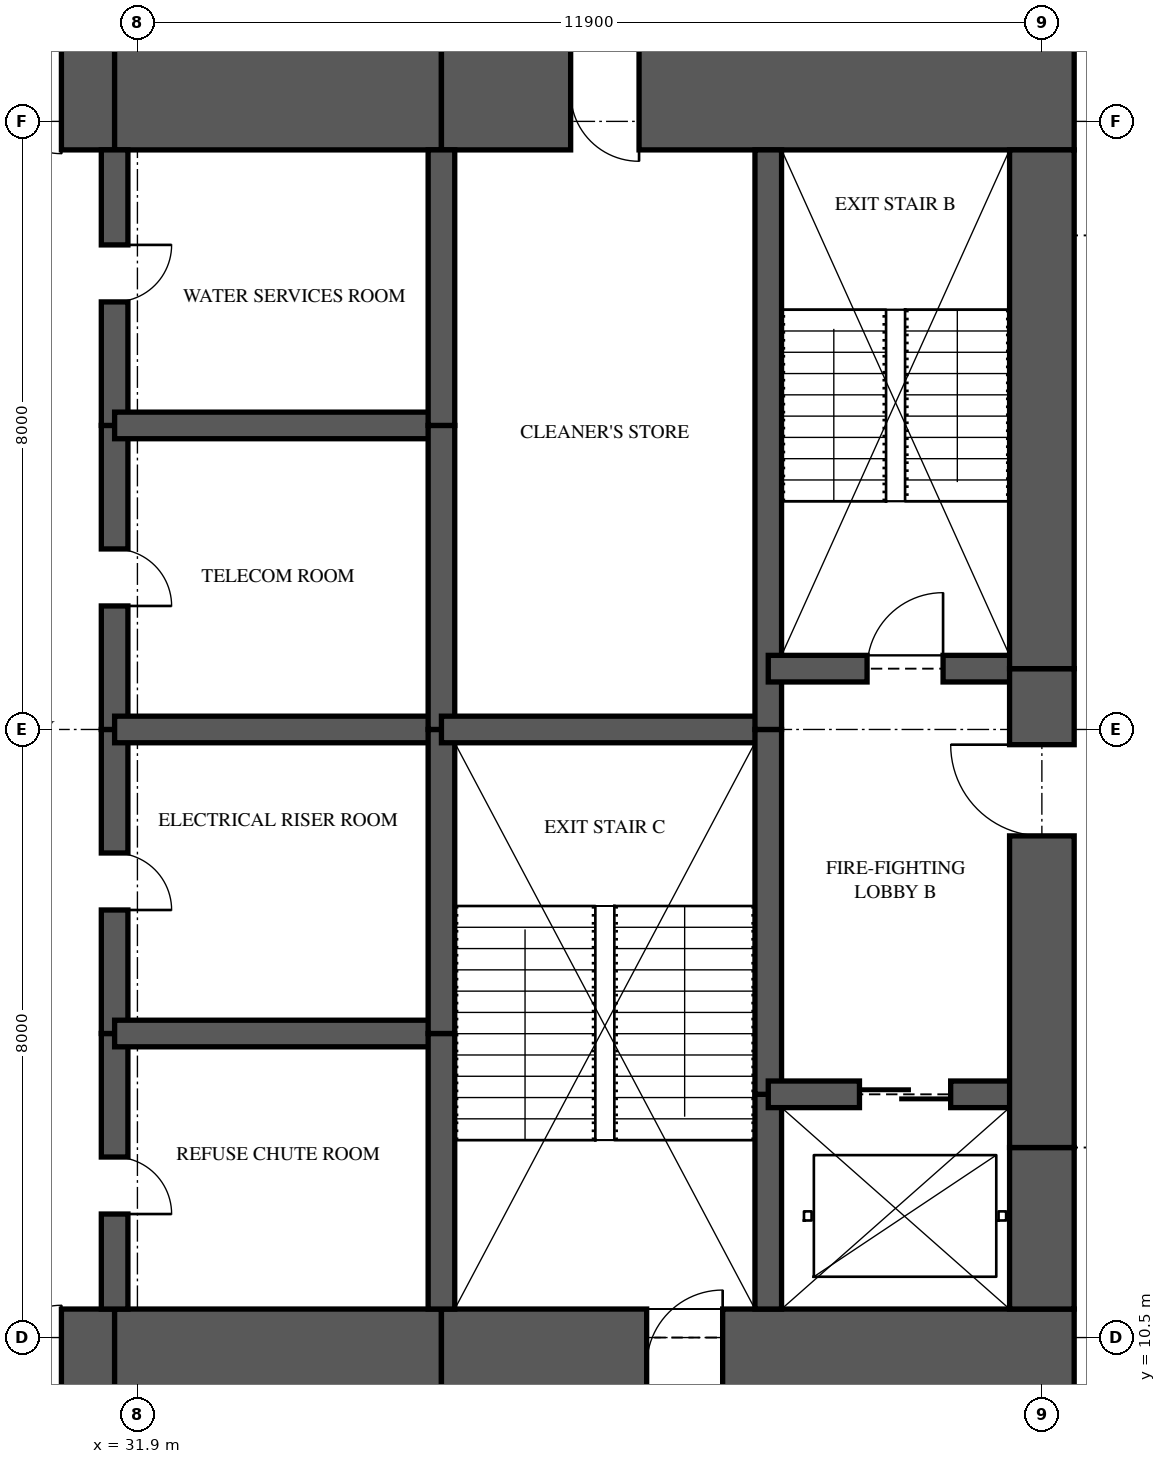
"""IFC4 building model, lengths in metres.
Left out: names, types, materials, properties, quantities, classifications, styles, units other than length and angle.
Written with IfcOpenShell. Run it as: python <this file> out.ifc"""

import sys

from ifc_helpers import new_model, si_unit, direction, frame, frame_2d, origin, place, context, subcontext, project, spatial, rectangle, extrude, element, fill, save


model = new_model("IFC4")
c1 = context("Model", 3, precision=1e-05, world=origin(), true_north=direction((0.0, 1.0)))
c2 = subcontext(c1, "Body", "Model", "MODEL_VIEW")
j1 = project(units=[si_unit("LENGTHUNIT", "METRE"), si_unit("PLANEANGLEUNIT", "RADIAN")], contexts=[c1])
p1 = place(None, origin())
s1 = spatial("IfcSite", under=j1, at=p1, CompositionType="ELEMENT")
p2 = place(p1, origin())
s2 = spatial("IfcBuilding", under=s1, at=p2, CompositionType="ELEMENT")
p3 = place(p2, frame((0.0, 0.0, 88.1)))
s3 = spatial("IfcBuildingStorey", under=s2, at=p3, CompositionType="ELEMENT", Elevation=88.1)
p4 = place(p3, frame((26.0, 10.125, 0.0), z_axis=(0.0, 0.0, 1.0), x_axis=(1.0, 0.0, 0.0)))
e1 = element("IfcWall", 1, at=p4, inside=s3, PredefinedType="SHEAR", context=c2, shape_type="SweptSolid", body=[
    extrude(rectangle(XDim=5.6, YDim=1.5, at=frame_2d((2.8, 0.0))), origin(), (0.0, 0.0, 1.0), 3.35),
])
p5 = place(p4, frame((3.3, 0.0, 0.0)))
e2 = element("IfcOpeningElement", 2, at=p5, cuts=e1, PredefinedType="OPENING", context=c2, shape_type="SweptSolid", body=[
    extrude(rectangle(XDim=1.6, YDim=2.1, at=frame_2d((0.8, 1.05))), frame((0.0, 0.76, 0.0), z_axis=(0.0, -1.0, 0.0), x_axis=(1.0, 0.0, 0.0)), (0.0, 0.0, 1.0), 1.52),
])
p6 = place(p3, frame((31.6, 10.125, 0.0), z_axis=(0.0, 0.0, 1.0), x_axis=(1.0, 0.0, 0.0)))
e3 = element("IfcWall", 3, at=p6, inside=s3, PredefinedType="SHEAR", context=c2, shape_type="SweptSolid", body=[
    extrude(rectangle(XDim=4.3, YDim=1.5, at=frame_2d((2.15, 0.0))), origin(), (0.0, 0.0, 1.0), 3.35),
])
p7 = place(p3, frame((35.9, 10.125, 0.0), z_axis=(0.0, 0.0, 1.0), x_axis=(1.0, 0.0, 0.0)))
e4 = element("IfcWall", 4, at=p7, inside=s3, PredefinedType="SHEAR", context=c2, shape_type="SweptSolid", body=[
    extrude(rectangle(XDim=8.325, YDim=1.5, at=frame_2d((4.163, 0.0))), origin(), (0.0, 0.0, 1.0), 3.35),
])
p8 = place(p7, frame((2.7, 0.0, 0.0)))
e5 = element("IfcOpeningElement", 5, at=p8, cuts=e4, PredefinedType="OPENING", context=c2, shape_type="SweptSolid", body=[
    extrude(rectangle(XDim=1.0, YDim=2.1, at=frame_2d((0.5, 1.05))), frame((0.0, 0.76, 0.0), z_axis=(0.0, -1.0, 0.0), x_axis=(1.0, 0.0, 0.0)), (0.0, 0.0, 1.0), 1.52),
])
p9 = place(p3, frame((44.225, 26.875, 0.0), z_axis=(0.0, 0.0, 1.0), x_axis=(-1.0, 0.0, 0.0)))
e6 = element("IfcWall", 6, at=p9, inside=s3, PredefinedType="SHEAR", context=c2, shape_type="SweptSolid", body=[
    extrude(rectangle(XDim=8.325, YDim=1.5, at=frame_2d((4.163, 0.0))), origin(), (0.0, 0.0, 1.0), 3.35),
])
p10 = place(p9, frame((5.725, 0.0, 0.0)))
e7 = element("IfcOpeningElement", 7, at=p10, cuts=e6, PredefinedType="OPENING", context=c2, shape_type="SweptSolid", body=[
    extrude(rectangle(XDim=0.9, YDim=2.1, at=frame_2d((0.45, 1.05))), frame((0.0, 0.76, 0.0), z_axis=(0.0, -1.0, 0.0), x_axis=(1.0, 0.0, 0.0)), (0.0, 0.0, 1.0), 1.52),
])
p11 = place(p3, frame((35.9, 26.875, 0.0), z_axis=(0.0, 0.0, 1.0), x_axis=(-1.0, 0.0, 0.0)))
e8 = element("IfcWall", 8, at=p11, inside=s3, PredefinedType="SHEAR", context=c2, shape_type="SweptSolid", body=[
    extrude(rectangle(XDim=4.3, YDim=1.5, at=frame_2d((2.15, 0.0))), origin(), (0.0, 0.0, 1.0), 3.35),
])
p12 = place(p3, frame((31.6, 26.875, 0.0), z_axis=(0.0, 0.0, 1.0), x_axis=(-1.0, 0.0, 0.0)))
e9 = element("IfcWall", 9, at=p12, inside=s3, PredefinedType="SHEAR", context=c2, shape_type="SweptSolid", body=[
    extrude(rectangle(XDim=5.6, YDim=1.5, at=frame_2d((2.8, 0.0))), origin(), (0.0, 0.0, 1.0), 3.35),
])
p13 = place(p12, frame((0.7, 0.0, 0.0)))
e10 = element("IfcOpeningElement", 10, at=p13, cuts=e9, PredefinedType="OPENING", context=c2, shape_type="SweptSolid", body=[
    extrude(rectangle(XDim=1.6, YDim=2.1, at=frame_2d((0.8, 1.05))), frame((0.0, 0.76, 0.0), z_axis=(0.0, -1.0, 0.0), x_axis=(1.0, 0.0, 0.0)), (0.0, 0.0, 1.0), 1.52),
])
p14 = place(p3, frame((43.8, 10.875, 0.0), z_axis=(0.0, 0.0, 1.0), x_axis=(0.0, 1.0, 0.0)))
e11 = element("IfcWall", 11, at=p14, inside=s3, PredefinedType="SHEAR", context=c2, shape_type="SweptSolid", body=[
    extrude(rectangle(XDim=2.125, YDim=0.85, at=frame_2d((1.062, 0.0))), origin(), (0.0, 0.0, 1.0), 3.35),
])
p15 = place(p3, frame((43.8, 13.0, 0.0), z_axis=(0.0, 0.0, 1.0), x_axis=(0.0, 1.0, 0.0)))
e12 = element("IfcWall", 12, at=p15, inside=s3, PredefinedType="SHEAR", context=c2, shape_type="SweptSolid", body=[
    extrude(rectangle(XDim=6.3, YDim=0.85, at=frame_2d((3.15, 0.0))), origin(), (0.0, 0.0, 1.0), 3.35),
])
p16 = place(p15, frame((4.1, 0.0, 0.0)))
e13 = element("IfcOpeningElement", 13, at=p16, cuts=e12, PredefinedType="OPENING", context=c2, shape_type="SweptSolid", body=[
    extrude(rectangle(XDim=1.2, YDim=2.2, at=frame_2d((0.6, 1.1))), frame((0.0, 0.435, 0.0), z_axis=(0.0, -1.0, 0.0), x_axis=(1.0, 0.0, 0.0)), (0.0, 0.0, 1.0), 0.87),
])
p17 = place(p3, frame((43.8, 19.3, 0.0), z_axis=(0.0, 0.0, 1.0), x_axis=(0.0, 1.0, 0.0)))
e14 = element("IfcWall", 14, at=p17, inside=s3, PredefinedType="SHEAR", context=c2, shape_type="SweptSolid", body=[
    extrude(rectangle(XDim=6.825, YDim=0.85, at=frame_2d((3.413, 0.0))), origin(), (0.0, 0.0, 1.0), 3.35),
])
p18 = place(p3, frame((31.6, 10.875, 0.0), z_axis=(0.0, 0.0, 1.0), x_axis=(0.0, 1.0, 0.0)))
e15 = element("IfcWall", 15, at=p18, inside=s3, PredefinedType="SHEAR", context=c2, shape_type="SweptSolid", body=[
    extrude(rectangle(XDim=3.625, YDim=0.35, at=frame_2d((1.812, 0.0))), origin(), (0.0, 0.0, 1.0), 3.35),
])
p19 = place(p18, frame((1.25, 0.0, 0.0)))
e16 = element("IfcOpeningElement", 16, at=p19, cuts=e15, PredefinedType="OPENING", context=c2, shape_type="SweptSolid", body=[
    extrude(rectangle(XDim=0.75, YDim=2.1, at=frame_2d((0.375, 1.05))), frame((0.0, 0.185, 0.0), z_axis=(0.0, -1.0, 0.0), x_axis=(1.0, 0.0, 0.0)), (0.0, 0.0, 1.0), 0.37),
])
p20 = place(p3, frame((31.6, 14.5, 0.0), z_axis=(0.0, 0.0, 1.0), x_axis=(0.0, 1.0, 0.0)))
e17 = element("IfcWall", 17, at=p20, inside=s3, PredefinedType="SHEAR", context=c2, shape_type="SweptSolid", body=[
    extrude(rectangle(XDim=4.0, YDim=0.35, at=frame_2d((2.0, 0.0))), origin(), (0.0, 0.0, 1.0), 3.35),
])
p21 = place(p20, frame((1.625, 0.0, 0.0)))
e18 = element("IfcOpeningElement", 18, at=p21, cuts=e17, PredefinedType="OPENING", context=c2, shape_type="SweptSolid", body=[
    extrude(rectangle(XDim=0.75, YDim=2.1, at=frame_2d((0.375, 1.05))), frame((0.0, 0.185, 0.0), z_axis=(0.0, -1.0, 0.0), x_axis=(1.0, 0.0, 0.0)), (0.0, 0.0, 1.0), 0.37),
])
p22 = place(p3, frame((31.6, 18.5, 0.0), z_axis=(0.0, 0.0, 1.0), x_axis=(0.0, 1.0, 0.0)))
e19 = element("IfcWall", 19, at=p22, inside=s3, PredefinedType="SHEAR", context=c2, shape_type="SweptSolid", body=[
    extrude(rectangle(XDim=4.0, YDim=0.35, at=frame_2d((2.0, 0.0))), origin(), (0.0, 0.0, 1.0), 3.35),
])
p23 = place(p22, frame((1.625, 0.0, 0.0)))
e20 = element("IfcOpeningElement", 20, at=p23, cuts=e19, PredefinedType="OPENING", context=c2, shape_type="SweptSolid", body=[
    extrude(rectangle(XDim=0.75, YDim=2.1, at=frame_2d((0.375, 1.05))), frame((0.0, 0.185, 0.0), z_axis=(0.0, -1.0, 0.0), x_axis=(1.0, 0.0, 0.0)), (0.0, 0.0, 1.0), 0.37),
])
p24 = place(p3, frame((31.6, 22.5, 0.0), z_axis=(0.0, 0.0, 1.0), x_axis=(0.0, 1.0, 0.0)))
e21 = element("IfcWall", 21, at=p24, inside=s3, PredefinedType="SHEAR", context=c2, shape_type="SweptSolid", body=[
    extrude(rectangle(XDim=3.625, YDim=0.35, at=frame_2d((1.812, 0.0))), origin(), (0.0, 0.0, 1.0), 3.35),
])
p25 = place(p24, frame((1.625, 0.0, 0.0)))
e22 = element("IfcOpeningElement", 22, at=p25, cuts=e21, PredefinedType="OPENING", context=c2, shape_type="SweptSolid", body=[
    extrude(rectangle(XDim=0.75, YDim=2.1, at=frame_2d((0.375, 1.05))), frame((0.0, 0.185, 0.0), z_axis=(0.0, -1.0, 0.0), x_axis=(1.0, 0.0, 0.0)), (0.0, 0.0, 1.0), 0.37),
])
p26 = place(p3, frame((35.9, 10.875, 0.0), z_axis=(0.0, 0.0, 1.0), x_axis=(0.0, 1.0, 0.0)))
e23 = element("IfcWall", 23, at=p26, inside=s3, PredefinedType="SHEAR", context=c2, shape_type="SweptSolid", body=[
    extrude(rectangle(XDim=3.625, YDim=0.35, at=frame_2d((1.812, 0.0))), origin(), (0.0, 0.0, 1.0), 3.35),
])
for number, where, z_axis, x_axis in (
    (24, (35.9, 14.5, 0.0), (0.0, 0.0, 1.0), (0.0, 1.0, 0.0)),
    (25, (35.9, 18.5, 0.0), (0.0, 0.0, 1.0), (0.0, 1.0, 0.0)),
):
    element("IfcWall", number, at=place(p3, frame(where, z_axis=z_axis, x_axis=x_axis)), inside=s3, PredefinedType="SHEAR", context=c2, shape_type="SweptSolid", body=[
        extrude(rectangle(XDim=4.0, YDim=0.35, at=frame_2d((2.0, 0.0))), origin(), (0.0, 0.0, 1.0), 3.35),
    ])
p27 = place(p3, frame((35.9, 22.5, 0.0), z_axis=(0.0, 0.0, 1.0), x_axis=(0.0, 1.0, 0.0)))
e26 = element("IfcWall", 26, at=p27, inside=s3, PredefinedType="SHEAR", context=c2, shape_type="SweptSolid", body=[
    extrude(rectangle(XDim=3.625, YDim=0.35, at=frame_2d((1.812, 0.0))), origin(), (0.0, 0.0, 1.0), 3.35),
])
p28 = place(p3, frame((40.2, 10.875, 0.0), z_axis=(0.0, 0.0, 1.0), x_axis=(0.0, 1.0, 0.0)))
e27 = element("IfcWall", 27, at=p28, inside=s3, PredefinedType="SHEAR", context=c2, shape_type="SweptSolid", body=[
    extrude(rectangle(XDim=2.825, YDim=0.35, at=frame_2d((1.413, 0.0))), origin(), (0.0, 0.0, 1.0), 3.35),
])
p29 = place(p3, frame((40.2, 13.7, 0.0), z_axis=(0.0, 0.0, 1.0), x_axis=(0.0, 1.0, 0.0)))
e28 = element("IfcWall", 28, at=p29, inside=s3, PredefinedType="SHEAR", context=c2, shape_type="SweptSolid", body=[
    extrude(rectangle(XDim=4.8, YDim=0.35, at=frame_2d((2.4, 0.0))), origin(), (0.0, 0.0, 1.0), 3.35),
])
p30 = place(p3, frame((40.2, 18.5, 0.0), z_axis=(0.0, 0.0, 1.0), x_axis=(0.0, 1.0, 0.0)))
e29 = element("IfcWall", 29, at=p30, inside=s3, PredefinedType="SHEAR", context=c2, shape_type="SweptSolid", body=[
    extrude(rectangle(XDim=7.625, YDim=0.35, at=frame_2d((3.812, 0.0))), origin(), (0.0, 0.0, 1.0), 3.35),
])
for number, where, z_axis, x_axis in (
    (30, (31.6, 14.5, 0.0), (0.0, 0.0, 1.0), (1.0, 0.0, 0.0)),
    (31, (31.6, 18.5, 0.0), (0.0, 0.0, 1.0), (1.0, 0.0, 0.0)),
    (32, (31.6, 22.5, 0.0), (0.0, 0.0, 1.0), (1.0, 0.0, 0.0)),
):
    element("IfcWall", number, at=place(p3, frame(where, z_axis=z_axis, x_axis=x_axis)), inside=s3, PredefinedType="SHEAR", context=c2, shape_type="SweptSolid", body=[
        extrude(rectangle(XDim=4.3, YDim=0.35, at=frame_2d((2.15, 0.0))), origin(), (0.0, 0.0, 1.0), 3.35),
    ])
p31 = place(p3, frame((35.9, 18.5, 0.0), z_axis=(0.0, 0.0, 1.0), x_axis=(1.0, 0.0, 0.0)))
e33 = element("IfcWall", 33, at=p31, inside=s3, PredefinedType="SHEAR", context=c2, shape_type="SweptSolid", body=[
    extrude(rectangle(XDim=4.3, YDim=0.35, at=frame_2d((2.15, 0.0))), origin(), (0.0, 0.0, 1.0), 3.35),
])
p32 = place(p3, frame((40.2, 13.7, 0.0), z_axis=(0.0, 0.0, 1.0), x_axis=(1.0, 0.0, 0.0)))
e34 = element("IfcWall", 34, at=p32, inside=s3, PredefinedType="SHEAR", context=c2, shape_type="SweptSolid", body=[
    extrude(rectangle(XDim=3.6, YDim=0.35, at=frame_2d((1.8, 0.0))), origin(), (0.0, 0.0, 1.0), 3.35),
])
p33 = place(p32, frame((1.2, 0.0, 0.0)))
e35 = element("IfcOpeningElement", 35, at=p33, cuts=e34, PredefinedType="OPENING", context=c2, shape_type="SweptSolid", body=[
    extrude(rectangle(XDim=1.2, YDim=2.1, at=frame_2d((0.6, 1.05))), frame((0.0, 0.185, 0.0), z_axis=(0.0, -1.0, 0.0), x_axis=(1.0, 0.0, 0.0)), (0.0, 0.0, 1.0), 0.37),
])
p34 = place(p3, frame((40.2, 19.3, 0.0), z_axis=(0.0, 0.0, 1.0), x_axis=(1.0, 0.0, 0.0)))
e36 = element("IfcWall", 36, at=p34, inside=s3, PredefinedType="SHEAR", context=c2, shape_type="SweptSolid", body=[
    extrude(rectangle(XDim=3.6, YDim=0.35, at=frame_2d((1.8, 0.0))), origin(), (0.0, 0.0, 1.0), 3.35),
])
p35 = place(p34, frame((1.3, 0.0, 0.0)))
e37 = element("IfcOpeningElement", 37, at=p35, cuts=e36, PredefinedType="OPENING", context=c2, shape_type="SweptSolid", body=[
    extrude(rectangle(XDim=1.0, YDim=2.1, at=frame_2d((0.5, 1.05))), frame((0.0, 0.185, 0.0), z_axis=(0.0, -1.0, 0.0), x_axis=(1.0, 0.0, 0.0)), (0.0, 0.0, 1.0), 0.37),
])
p36 = place(p35, origin())
e38 = element("IfcDoor", 38, at=p36, inside=s3, OperationType="SINGLE_SWING_RIGHT", PredefinedType="DOOR", context=c2, shape_type="SweptSolid", body=[
    extrude(rectangle(XDim=1.0, YDim=2.1, at=frame_2d((0.5, 1.05))), frame((0.0, 0.025, 0.0), z_axis=(0.0, -1.0, 0.0), x_axis=(1.0, 0.0, 0.0)), (0.0, 0.0, 1.0), 0.05),
])
fill(e37, e38)
p37 = place(p16, origin())
e39 = element("IfcDoor", 39, at=p37, inside=s3, OperationType="SINGLE_SWING_RIGHT", PredefinedType="DOOR", context=c2, shape_type="SweptSolid", body=[
    extrude(rectangle(XDim=1.2, YDim=2.2, at=frame_2d((0.6, 1.1))), frame((0.0, 0.025, 0.0), z_axis=(0.0, -1.0, 0.0), x_axis=(1.0, 0.0, 0.0)), (0.0, 0.0, 1.0), 0.05),
])
fill(e13, e39)
p38 = place(p33, origin())
e40 = element("IfcDoor", 40, at=p38, inside=s3, OperationType="SLIDING_TO_LEFT", PredefinedType="DOOR", context=c2, shape_type="SweptSolid", body=[
    extrude(rectangle(XDim=1.2, YDim=2.1, at=frame_2d((0.6, 1.05))), frame((0.0, 0.025, 0.0), z_axis=(0.0, -1.0, 0.0), x_axis=(1.0, 0.0, 0.0)), (0.0, 0.0, 1.0), 0.05),
])
fill(e35, e40)
p39 = place(p5, origin())
e41 = element("IfcDoor", 41, at=p39, inside=s3, OperationType="DOUBLE_DOOR_SINGLE_SWING", PredefinedType="DOOR", context=c2, shape_type="SweptSolid", body=[
    extrude(rectangle(XDim=1.6, YDim=2.1, at=frame_2d((0.8, 1.05))), frame((0.0, 0.025, 0.0), z_axis=(0.0, -1.0, 0.0), x_axis=(1.0, 0.0, 0.0)), (0.0, 0.0, 1.0), 0.05),
])
fill(e2, e41)
p40 = place(p13, origin())
e42 = element("IfcDoor", 42, at=p40, inside=s3, OperationType="DOUBLE_DOOR_SINGLE_SWING", PredefinedType="DOOR", context=c2, shape_type="SweptSolid", body=[
    extrude(rectangle(XDim=1.6, YDim=2.1, at=frame_2d((0.8, 1.05))), frame((0.0, 0.025, 0.0), z_axis=(0.0, -1.0, 0.0), x_axis=(1.0, 0.0, 0.0)), (0.0, 0.0, 1.0), 0.05),
])
fill(e10, e42)
p41 = place(p19, frame((0.75, 0.0, 0.0), z_axis=(0.0, 0.0, 1.0), x_axis=(-1.0, 0.0, 0.0)))
e43 = element("IfcDoor", 43, at=p41, inside=s3, OperationType="SINGLE_SWING_RIGHT", PredefinedType="DOOR", context=c2, shape_type="SweptSolid", body=[
    extrude(rectangle(XDim=0.75, YDim=2.1, at=frame_2d((0.375, 1.05))), frame((0.0, 0.025, 0.0), z_axis=(0.0, -1.0, 0.0), x_axis=(1.0, 0.0, 0.0)), (0.0, 0.0, 1.0), 0.05),
])
fill(e16, e43)
p42 = place(p21, frame((0.75, 0.0, 0.0), z_axis=(0.0, 0.0, 1.0), x_axis=(-1.0, 0.0, 0.0)))
e44 = element("IfcDoor", 44, at=p42, inside=s3, OperationType="SINGLE_SWING_RIGHT", PredefinedType="DOOR", context=c2, shape_type="SweptSolid", body=[
    extrude(rectangle(XDim=0.75, YDim=2.1, at=frame_2d((0.375, 1.05))), frame((0.0, 0.025, 0.0), z_axis=(0.0, -1.0, 0.0), x_axis=(1.0, 0.0, 0.0)), (0.0, 0.0, 1.0), 0.05),
])
fill(e18, e44)
p43 = place(p23, frame((0.75, 0.0, 0.0), z_axis=(0.0, 0.0, 1.0), x_axis=(-1.0, 0.0, 0.0)))
e45 = element("IfcDoor", 45, at=p43, inside=s3, OperationType="SINGLE_SWING_RIGHT", PredefinedType="DOOR", context=c2, shape_type="SweptSolid", body=[
    extrude(rectangle(XDim=0.75, YDim=2.1, at=frame_2d((0.375, 1.05))), frame((0.0, 0.025, 0.0), z_axis=(0.0, -1.0, 0.0), x_axis=(1.0, 0.0, 0.0)), (0.0, 0.0, 1.0), 0.05),
])
fill(e20, e45)
p44 = place(p25, frame((0.75, 0.0, 0.0), z_axis=(0.0, 0.0, 1.0), x_axis=(-1.0, 0.0, 0.0)))
e46 = element("IfcDoor", 46, at=p44, inside=s3, OperationType="SINGLE_SWING_LEFT", PredefinedType="DOOR", context=c2, shape_type="SweptSolid", body=[
    extrude(rectangle(XDim=0.75, YDim=2.1, at=frame_2d((0.375, 1.05))), frame((0.0, 0.025, 0.0), z_axis=(0.0, -1.0, 0.0), x_axis=(1.0, 0.0, 0.0)), (0.0, 0.0, 1.0), 0.05),
])
fill(e22, e46)
p45 = place(p8, origin())
e47 = element("IfcDoor", 47, at=p45, inside=s3, OperationType="SINGLE_SWING_RIGHT", PredefinedType="DOOR", context=c2, shape_type="SweptSolid", body=[
    extrude(rectangle(XDim=1.0, YDim=2.1, at=frame_2d((0.5, 1.05))), frame((0.0, 0.025, 0.0), z_axis=(0.0, -1.0, 0.0), x_axis=(1.0, 0.0, 0.0)), (0.0, 0.0, 1.0), 0.05),
])
fill(e5, e47)
p46 = place(p10, origin())
e48 = element("IfcDoor", 48, at=p46, inside=s3, OperationType="SINGLE_SWING_LEFT", PredefinedType="DOOR", context=c2, shape_type="SweptSolid", body=[
    extrude(rectangle(XDim=0.9, YDim=2.1, at=frame_2d((0.45, 1.05))), frame((0.0, 0.47, 0.0), z_axis=(0.0, -1.0, 0.0), x_axis=(1.0, 0.0, 0.0)), (0.0, 0.0, 1.0), 0.8),
])
fill(e7, e48)
save(model, sys.argv[1])
